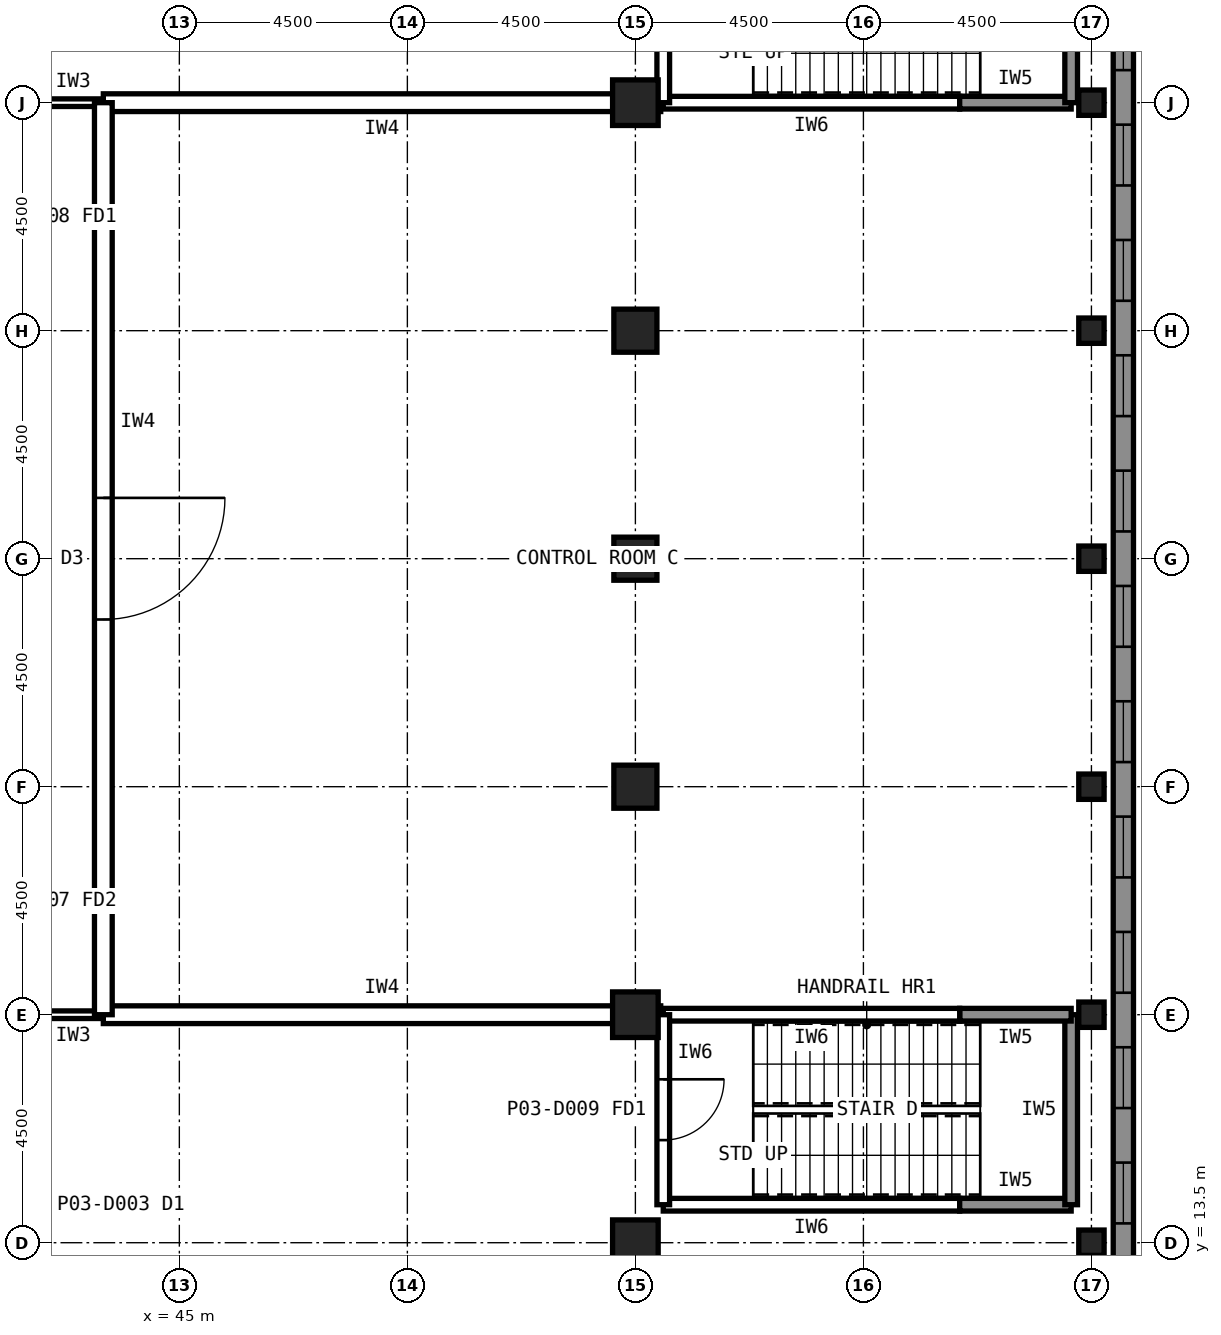
"""IFC4 building model, lengths in metres.
Left out: names, types, materials, properties, quantities, classifications, styles, units other than length and angle.
Written with IfcOpenShell. Run it as: python <this file> out.ifc"""

import sys

from ifc_helpers import new_model, si_unit, direction, frame, frame_2d, origin, origin_2d, place, context, subcontext, project, spatial, rectangle, hollow_rectangle, extrude, element, fill, save


model = new_model("IFC4")
c1 = context("Model", 3, precision=1e-05, world=origin(), true_north=direction((0.0, 1.0)))
c2 = subcontext(c1, "Body", "Model", "MODEL_VIEW")
j1 = project(units=[si_unit("LENGTHUNIT", "METRE"), si_unit("PLANEANGLEUNIT", "RADIAN")], contexts=[c1])
p1 = place(None, origin())
s1 = spatial("IfcSite", under=j1, at=p1, CompositionType="ELEMENT")
p2 = place(p1, origin())
s2 = spatial("IfcBuilding", under=s1, at=p2, CompositionType="ELEMENT")
p3 = place(p2, frame((0.0, 0.0, 12.0)))
s3 = spatial("IfcBuildingStorey", under=s2, at=p3, CompositionType="ELEMENT", Elevation=12.0)
for number, where, z_axis, x_axis in (
    (1, (54.0, 13.5, 0.0), (0.0, 0.0, 1.0), (1.0, 0.0, 0.0)),
    (2, (54.0, 18.0, 0.0), (0.0, 0.0, 1.0), (1.0, 0.0, 0.0)),
):
    element("IfcColumn", number, at=place(p3, frame(where, z_axis=z_axis, x_axis=x_axis)), inside=s3, PredefinedType="COLUMN", context=c2, shape_type="SweptSolid", body=[
        extrude(hollow_rectangle(XDim=0.9, YDim=0.9, WallThickness=0.063, at=origin_2d()), origin(), (0.0, 0.0, 1.0), 6.0),
    ])
for number, where, z_axis, x_axis in (
    (3, (54.0, 22.5, 0.0), (0.0, 0.0, 1.0), (1.0, 0.0, 0.0)),
    (4, (54.0, 27.0, 0.0), (0.0, 0.0, 1.0), (1.0, 0.0, 0.0)),
    (5, (54.0, 31.5, 0.0), (0.0, 0.0, 1.0), (1.0, 0.0, 0.0)),
):
    element("IfcColumn", number, at=place(p3, frame(where, z_axis=z_axis, x_axis=x_axis)), inside=s3, PredefinedType="COLUMN", context=c2, shape_type="SweptSolid", body=[
        extrude(hollow_rectangle(XDim=0.85, YDim=0.85, WallThickness=0.05, at=origin_2d()), origin(), (0.0, 0.0, 1.0), 6.0),
    ])
p4 = place(p3, frame((54.0, 36.0, 0.0), z_axis=(0.0, 0.0, 1.0), x_axis=(1.0, 0.0, 0.0)))
e6 = element("IfcColumn", 6, at=p4, inside=s3, PredefinedType="COLUMN", context=c2, shape_type="SweptSolid", body=[
    extrude(hollow_rectangle(XDim=0.9, YDim=0.9, WallThickness=0.063, at=origin_2d()), origin(), (0.0, 0.0, 1.0), 6.0),
])
for number, where, z_axis, x_axis in (
    (7, (63.0, 13.5, 0.0), (0.0, 0.0, 1.0), (1.0, 0.0, 0.0)),
    (8, (63.0, 18.0, 0.0), (0.0, 0.0, 1.0), (1.0, 0.0, 0.0)),
    (9, (63.0, 22.5, 0.0), (0.0, 0.0, 1.0), (1.0, 0.0, 0.0)),
    (10, (63.0, 27.0, 0.0), (0.0, 0.0, 1.0), (1.0, 0.0, 0.0)),
    (11, (63.0, 31.5, 0.0), (0.0, 0.0, 1.0), (1.0, 0.0, 0.0)),
    (12, (63.0, 36.0, 0.0), (0.0, 0.0, 1.0), (1.0, 0.0, 0.0)),
):
    element("IfcColumn", number, at=place(p3, frame(where, z_axis=z_axis, x_axis=x_axis)), inside=s3, PredefinedType="COLUMN", context=c2, shape_type="SweptSolid", body=[
        extrude(hollow_rectangle(XDim=0.5, YDim=0.5, WallThickness=0.022, at=origin_2d()), origin(), (0.0, 0.0, 1.0), 6.0),
    ])
p5 = place(p3, frame((63.63, 49.761, 0.0), z_axis=(0.0, 0.0, 1.0), x_axis=(0.0, -1.0, 0.0)))
e13 = element("IfcWall", 13, at=p5, inside=s3, PredefinedType="SOLIDWALL", context=c2, shape_type="SweptSolid", body=[
    extrude(rectangle(XDim=45.522, YDim=0.4, at=frame_2d((22.761, 0.0))), origin(), (0.0, 0.0, 1.0), 6.0),
])
p6 = place(p5, frame((0.538, 0.0, 0.9)))
e14 = element("IfcOpeningElement", 14, at=p6, cuts=e13, PredefinedType="OPENING", context=c2, shape_type="SweptSolid", body=[
    extrude(rectangle(XDim=1.2, YDim=1.5, at=frame_2d((0.6, 0.75))), frame((0.0, 0.21, 0.0), z_axis=(0.0, -1.0, 0.0), x_axis=(1.0, 0.0, 0.0)), (0.0, 0.0, 1.0), 0.42),
])
p7 = place(p5, frame((2.814, 0.0, 0.9)))
e15 = element("IfcOpeningElement", 15, at=p7, cuts=e13, PredefinedType="OPENING", context=c2, shape_type="SweptSolid", body=[
    extrude(rectangle(XDim=1.2, YDim=1.5, at=frame_2d((0.6, 0.75))), frame((0.0, 0.21, 0.0), z_axis=(0.0, -1.0, 0.0), x_axis=(1.0, 0.0, 0.0)), (0.0, 0.0, 1.0), 0.42),
])
p8 = place(p5, frame((5.09, 0.0, 0.9)))
e16 = element("IfcOpeningElement", 16, at=p8, cuts=e13, PredefinedType="OPENING", context=c2, shape_type="SweptSolid", body=[
    extrude(rectangle(XDim=1.2, YDim=1.5, at=frame_2d((0.6, 0.75))), frame((0.0, 0.21, 0.0), z_axis=(0.0, -1.0, 0.0), x_axis=(1.0, 0.0, 0.0)), (0.0, 0.0, 1.0), 0.42),
])
p9 = place(p5, frame((7.366, 0.0, 0.9)))
e17 = element("IfcOpeningElement", 17, at=p9, cuts=e13, PredefinedType="OPENING", context=c2, shape_type="SweptSolid", body=[
    extrude(rectangle(XDim=1.2, YDim=1.5, at=frame_2d((0.6, 0.75))), frame((0.0, 0.21, 0.0), z_axis=(0.0, -1.0, 0.0), x_axis=(1.0, 0.0, 0.0)), (0.0, 0.0, 1.0), 0.42),
])
p10 = place(p5, frame((9.642, 0.0, 0.9)))
e18 = element("IfcOpeningElement", 18, at=p10, cuts=e13, PredefinedType="OPENING", context=c2, shape_type="SweptSolid", body=[
    extrude(rectangle(XDim=1.2, YDim=1.5, at=frame_2d((0.6, 0.75))), frame((0.0, 0.21, 0.0), z_axis=(0.0, -1.0, 0.0), x_axis=(1.0, 0.0, 0.0)), (0.0, 0.0, 1.0), 0.42),
])
p11 = place(p5, frame((11.918, 0.0, 0.9)))
e19 = element("IfcOpeningElement", 19, at=p11, cuts=e13, PredefinedType="OPENING", context=c2, shape_type="SweptSolid", body=[
    extrude(rectangle(XDim=1.2, YDim=1.5, at=frame_2d((0.6, 0.75))), frame((0.0, 0.21, 0.0), z_axis=(0.0, -1.0, 0.0), x_axis=(1.0, 0.0, 0.0)), (0.0, 0.0, 1.0), 0.42),
])
p12 = place(p5, frame((14.195, 0.0, 0.9)))
e20 = element("IfcOpeningElement", 20, at=p12, cuts=e13, PredefinedType="OPENING", context=c2, shape_type="SweptSolid", body=[
    extrude(rectangle(XDim=1.2, YDim=1.5, at=frame_2d((0.6, 0.75))), frame((0.0, 0.21, 0.0), z_axis=(0.0, -1.0, 0.0), x_axis=(1.0, 0.0, 0.0)), (0.0, 0.0, 1.0), 0.42),
])
p13 = place(p5, frame((16.471, 0.0, 0.9)))
e21 = element("IfcOpeningElement", 21, at=p13, cuts=e13, PredefinedType="OPENING", context=c2, shape_type="SweptSolid", body=[
    extrude(rectangle(XDim=1.2, YDim=1.5, at=frame_2d((0.6, 0.75))), frame((0.0, 0.21, 0.0), z_axis=(0.0, -1.0, 0.0), x_axis=(1.0, 0.0, 0.0)), (0.0, 0.0, 1.0), 0.42),
])
p14 = place(p5, frame((18.747, 0.0, 0.9)))
e22 = element("IfcOpeningElement", 22, at=p14, cuts=e13, PredefinedType="OPENING", context=c2, shape_type="SweptSolid", body=[
    extrude(rectangle(XDim=1.2, YDim=1.5, at=frame_2d((0.6, 0.75))), frame((0.0, 0.21, 0.0), z_axis=(0.0, -1.0, 0.0), x_axis=(1.0, 0.0, 0.0)), (0.0, 0.0, 1.0), 0.42),
])
p15 = place(p5, frame((21.023, 0.0, 0.9)))
e23 = element("IfcOpeningElement", 23, at=p15, cuts=e13, PredefinedType="OPENING", context=c2, shape_type="SweptSolid", body=[
    extrude(rectangle(XDim=1.2, YDim=1.5, at=frame_2d((0.6, 0.75))), frame((0.0, 0.21, 0.0), z_axis=(0.0, -1.0, 0.0), x_axis=(1.0, 0.0, 0.0)), (0.0, 0.0, 1.0), 0.42),
])
p16 = place(p5, frame((23.299, 0.0, 0.9)))
e24 = element("IfcOpeningElement", 24, at=p16, cuts=e13, PredefinedType="OPENING", context=c2, shape_type="SweptSolid", body=[
    extrude(rectangle(XDim=1.2, YDim=1.5, at=frame_2d((0.6, 0.75))), frame((0.0, 0.21, 0.0), z_axis=(0.0, -1.0, 0.0), x_axis=(1.0, 0.0, 0.0)), (0.0, 0.0, 1.0), 0.42),
])
p17 = place(p5, frame((25.575, 0.0, 0.9)))
e25 = element("IfcOpeningElement", 25, at=p17, cuts=e13, PredefinedType="OPENING", context=c2, shape_type="SweptSolid", body=[
    extrude(rectangle(XDim=1.2, YDim=1.5, at=frame_2d((0.6, 0.75))), frame((0.0, 0.21, 0.0), z_axis=(0.0, -1.0, 0.0), x_axis=(1.0, 0.0, 0.0)), (0.0, 0.0, 1.0), 0.42),
])
p18 = place(p5, frame((27.851, 0.0, 0.9)))
e26 = element("IfcOpeningElement", 26, at=p18, cuts=e13, PredefinedType="OPENING", context=c2, shape_type="SweptSolid", body=[
    extrude(rectangle(XDim=1.2, YDim=1.5, at=frame_2d((0.6, 0.75))), frame((0.0, 0.21, 0.0), z_axis=(0.0, -1.0, 0.0), x_axis=(1.0, 0.0, 0.0)), (0.0, 0.0, 1.0), 0.42),
])
p19 = place(p5, frame((30.127, 0.0, 0.9)))
e27 = element("IfcOpeningElement", 27, at=p19, cuts=e13, PredefinedType="OPENING", context=c2, shape_type="SweptSolid", body=[
    extrude(rectangle(XDim=1.2, YDim=1.5, at=frame_2d((0.6, 0.75))), frame((0.0, 0.21, 0.0), z_axis=(0.0, -1.0, 0.0), x_axis=(1.0, 0.0, 0.0)), (0.0, 0.0, 1.0), 0.42),
])
p20 = place(p5, frame((32.404, 0.0, 0.9)))
e28 = element("IfcOpeningElement", 28, at=p20, cuts=e13, PredefinedType="OPENING", context=c2, shape_type="SweptSolid", body=[
    extrude(rectangle(XDim=1.2, YDim=1.5, at=frame_2d((0.6, 0.75))), frame((0.0, 0.21, 0.0), z_axis=(0.0, -1.0, 0.0), x_axis=(1.0, 0.0, 0.0)), (0.0, 0.0, 1.0), 0.42),
])
p21 = place(p5, frame((34.679, 0.0, 0.9)))
e29 = element("IfcOpeningElement", 29, at=p21, cuts=e13, PredefinedType="OPENING", context=c2, shape_type="SweptSolid", body=[
    extrude(rectangle(XDim=1.2, YDim=1.5, at=frame_2d((0.6, 0.75))), frame((0.0, 0.21, 0.0), z_axis=(0.0, -1.0, 0.0), x_axis=(1.0, 0.0, 0.0)), (0.0, 0.0, 1.0), 0.42),
])
p22 = place(p5, frame((36.956, 0.0, 0.9)))
e30 = element("IfcOpeningElement", 30, at=p22, cuts=e13, PredefinedType="OPENING", context=c2, shape_type="SweptSolid", body=[
    extrude(rectangle(XDim=1.2, YDim=1.5, at=frame_2d((0.6, 0.75))), frame((0.0, 0.21, 0.0), z_axis=(0.0, -1.0, 0.0), x_axis=(1.0, 0.0, 0.0)), (0.0, 0.0, 1.0), 0.42),
])
p23 = place(p5, frame((39.232, 0.0, 0.9)))
e31 = element("IfcOpeningElement", 31, at=p23, cuts=e13, PredefinedType="OPENING", context=c2, shape_type="SweptSolid", body=[
    extrude(rectangle(XDim=1.2, YDim=1.5, at=frame_2d((0.6, 0.75))), frame((0.0, 0.21, 0.0), z_axis=(0.0, -1.0, 0.0), x_axis=(1.0, 0.0, 0.0)), (0.0, 0.0, 1.0), 0.42),
])
p24 = place(p5, frame((41.508, 0.0, 0.9)))
e32 = element("IfcOpeningElement", 32, at=p24, cuts=e13, PredefinedType="OPENING", context=c2, shape_type="SweptSolid", body=[
    extrude(rectangle(XDim=1.2, YDim=1.5, at=frame_2d((0.6, 0.75))), frame((0.0, 0.21, 0.0), z_axis=(0.0, -1.0, 0.0), x_axis=(1.0, 0.0, 0.0)), (0.0, 0.0, 1.0), 0.42),
])
p25 = place(p5, frame((43.784, 0.0, 0.9)))
e33 = element("IfcOpeningElement", 33, at=p25, cuts=e13, PredefinedType="OPENING", context=c2, shape_type="SweptSolid", body=[
    extrude(rectangle(XDim=1.2, YDim=1.5, at=frame_2d((0.6, 0.75))), frame((0.0, 0.21, 0.0), z_axis=(0.0, -1.0, 0.0), x_axis=(1.0, 0.0, 0.0)), (0.0, 0.0, 1.0), 0.42),
])
for number, where, z_axis, x_axis in (
    (34, (42.3, 18.0, 0.0), (0.0, 0.0, 1.0), (1.0, 0.0, 0.0)),
    (35, (43.51, 36.0, 0.0), (0.0, 0.0, 1.0), (-1.0, 0.0, 0.0)),
):
    element("IfcWall", number, at=place(p3, frame(where, z_axis=z_axis, x_axis=x_axis)), inside=s3, PredefinedType="PARTITIONING", context=c2, shape_type="SweptSolid", body=[
        extrude(rectangle(XDim=1.21, YDim=0.15, at=frame_2d((0.605, 0.0))), origin(), (0.0, 0.0, 1.0), 4.949),
    ])
for number, where, z_axis, x_axis in (
    (36, (43.5, 18.0, 0.0), (0.0, 0.0, 1.0), (1.0, 0.0, 0.0)),
    (37, (54.5, 36.0, 0.0), (0.0, 0.0, 1.0), (-1.0, 0.0, 0.0)),
):
    element("IfcWall", number, at=place(p3, frame(where, z_axis=z_axis, x_axis=x_axis)), inside=s3, PredefinedType="PARTITIONING", context=c2, shape_type="SweptSolid", body=[
        extrude(rectangle(XDim=11.0, YDim=0.35, at=frame_2d((5.5, 0.0))), origin(), (0.0, 0.0, 1.0), 4.949),
    ])
p26 = place(p3, frame((43.5, 36.0, 0.0), z_axis=(0.0, 0.0, 1.0), x_axis=(0.0, -1.0, 0.0)))
e38 = element("IfcWall", 38, at=p26, inside=s3, PredefinedType="PARTITIONING", context=c2, shape_type="SweptSolid", body=[
    extrude(rectangle(XDim=18.0, YDim=0.35, at=frame_2d((9.0, 0.0))), origin(), (0.0, 0.0, 1.0), 5.8),
])
p27 = place(p26, frame((7.8, 0.0, 0.0)))
e39 = element("IfcOpeningElement", 39, at=p27, cuts=e38, PredefinedType="OPENING", context=c2, shape_type="SweptSolid", body=[
    extrude(rectangle(XDim=2.4, YDim=3.0, at=frame_2d((1.2, 1.5))), frame((0.0, 0.185, 0.0), z_axis=(0.0, -1.0, 0.0), x_axis=(1.0, 0.0, 0.0)), (0.0, 0.0, 1.0), 0.37),
])
p28 = place(p3, frame((54.55, 14.25, 0.0), z_axis=(0.0, 0.0, 1.0), x_axis=(1.0, 0.0, 0.0)))
e40 = element("IfcWall", 40, at=p28, inside=s3, PredefinedType="PARTITIONING", context=c2, shape_type="SweptSolid", body=[
    extrude(rectangle(XDim=5.85, YDim=0.25, at=frame_2d((2.925, 0.0))), origin(), (0.0, 0.0, 1.0), 5.8),
])
p29 = place(p3, frame((60.4, 14.25, 0.0), z_axis=(0.0, 0.0, 1.0), x_axis=(1.0, 0.0, 0.0)))
e41 = element("IfcWall", 41, at=p29, inside=s3, PredefinedType="SOLIDWALL", context=c2, shape_type="SweptSolid", body=[
    extrude(rectangle(XDim=2.2, YDim=0.25, at=frame_2d((1.1, 0.0))), origin(), (0.0, 0.0, 1.0), 6.0),
])
p30 = place(p3, frame((62.6, 14.25, 0.0), z_axis=(0.0, 0.0, 1.0), x_axis=(0.0, 1.0, 0.0)))
e42 = element("IfcWall", 42, at=p30, inside=s3, PredefinedType="SOLIDWALL", context=c2, shape_type="SweptSolid", body=[
    extrude(rectangle(XDim=3.75, YDim=0.25, at=frame_2d((1.875, 0.0))), origin(), (0.0, 0.0, 1.0), 6.0),
])
p31 = place(p3, frame((62.6, 18.0, 0.0), z_axis=(0.0, 0.0, 1.0), x_axis=(-1.0, 0.0, 0.0)))
e43 = element("IfcWall", 43, at=p31, inside=s3, PredefinedType="SOLIDWALL", context=c2, shape_type="SweptSolid", body=[
    extrude(rectangle(XDim=2.2, YDim=0.25, at=frame_2d((1.1, 0.0))), origin(), (0.0, 0.0, 1.0), 5.189),
])
p32 = place(p3, frame((60.4, 18.0, 0.0), z_axis=(0.0, 0.0, 1.0), x_axis=(-1.0, 0.0, 0.0)))
e44 = element("IfcWall", 44, at=p32, inside=s3, PredefinedType="PARTITIONING", context=c2, shape_type="SweptSolid", body=[
    extrude(rectangle(XDim=5.85, YDim=0.25, at=frame_2d((2.925, 0.0))), origin(), (0.0, 0.0, 1.0), 5.189),
])
p33 = place(p3, frame((54.55, 18.0, 0.0), z_axis=(0.0, 0.0, 1.0), x_axis=(0.0, -1.0, 0.0)))
e45 = element("IfcWall", 45, at=p33, inside=s3, PredefinedType="PARTITIONING", context=c2, shape_type="SweptSolid", body=[
    extrude(rectangle(XDim=3.75, YDim=0.25, at=frame_2d((1.875, 0.0))), origin(), (0.0, 0.0, 1.0), 5.8),
])
p34 = place(p33, frame((1.275, 0.0, 0.0)))
e46 = element("IfcOpeningElement", 46, at=p34, cuts=e45, PredefinedType="OPENING", context=c2, shape_type="SweptSolid", body=[
    extrude(rectangle(XDim=1.2, YDim=2.1, at=frame_2d((0.6, 1.05))), frame((0.0, 0.135, 0.0), z_axis=(0.0, -1.0, 0.0), x_axis=(1.0, 0.0, 0.0)), (0.0, 0.0, 1.0), 0.27),
])
p35 = place(p3, frame((54.55, 36.0, 0.0), z_axis=(0.0, 0.0, 1.0), x_axis=(1.0, 0.0, 0.0)))
e47 = element("IfcWall", 47, at=p35, inside=s3, PredefinedType="PARTITIONING", context=c2, shape_type="SweptSolid", body=[
    extrude(rectangle(XDim=5.85, YDim=0.25, at=frame_2d((2.925, 0.0))), origin(), (0.0, 0.0, 1.0), 5.189),
])
p36 = place(p3, frame((60.4, 36.0, 0.0), z_axis=(0.0, 0.0, 1.0), x_axis=(1.0, 0.0, 0.0)))
e48 = element("IfcWall", 48, at=p36, inside=s3, PredefinedType="SOLIDWALL", context=c2, shape_type="SweptSolid", body=[
    extrude(rectangle(XDim=2.2, YDim=0.25, at=frame_2d((1.1, 0.0))), origin(), (0.0, 0.0, 1.0), 5.189),
])
p37 = place(p3, frame((62.6, 36.0, 0.0), z_axis=(0.0, 0.0, 1.0), x_axis=(0.0, 1.0, 0.0)))
e49 = element("IfcWall", 49, at=p37, inside=s3, PredefinedType="SOLIDWALL", context=c2, shape_type="SweptSolid", body=[
    extrude(rectangle(XDim=3.75, YDim=0.25, at=frame_2d((1.875, 0.0))), origin(), (0.0, 0.0, 1.0), 6.0),
])
p38 = place(p3, frame((54.55, 39.75, 0.0), z_axis=(0.0, 0.0, 1.0), x_axis=(0.0, -1.0, 0.0)))
e50 = element("IfcWall", 50, at=p38, inside=s3, PredefinedType="PARTITIONING", context=c2, shape_type="SweptSolid", body=[
    extrude(rectangle(XDim=3.75, YDim=0.25, at=frame_2d((1.875, 0.0))), origin(), (0.0, 0.0, 1.0), 5.8),
])
p39 = place(p38, frame((1.275, 0.0, 0.0)))
e51 = element("IfcOpeningElement", 51, at=p39, cuts=e50, PredefinedType="OPENING", context=c2, shape_type="SweptSolid", body=[
    extrude(rectangle(XDim=1.2, YDim=2.1, at=frame_2d((0.6, 1.05))), frame((0.0, 0.135, 0.0), z_axis=(0.0, -1.0, 0.0), x_axis=(1.0, 0.0, 0.0)), (0.0, 0.0, 1.0), 0.27),
])
p40 = place(p11, origin())
e52 = element("IfcWindow", 52, at=p40, inside=s3, PartitioningType="SINGLE_PANEL", PredefinedType="WINDOW", context=c2, shape_type="SweptSolid", body=[
    extrude(rectangle(XDim=1.2, YDim=1.5, at=frame_2d((0.6, 0.75))), frame((0.0, 0.03, 0.0), z_axis=(0.0, -1.0, 0.0), x_axis=(1.0, 0.0, 0.0)), (0.0, 0.0, 1.0), 0.06),
])
fill(e19, e52)
p41 = place(p12, origin())
e53 = element("IfcWindow", 53, at=p41, inside=s3, PartitioningType="SINGLE_PANEL", PredefinedType="WINDOW", context=c2, shape_type="SweptSolid", body=[
    extrude(rectangle(XDim=1.2, YDim=1.5, at=frame_2d((0.6, 0.75))), frame((0.0, 0.03, 0.0), z_axis=(0.0, -1.0, 0.0), x_axis=(1.0, 0.0, 0.0)), (0.0, 0.0, 1.0), 0.06),
])
fill(e20, e53)
p42 = place(p13, origin())
e54 = element("IfcWindow", 54, at=p42, inside=s3, PartitioningType="SINGLE_PANEL", PredefinedType="WINDOW", context=c2, shape_type="SweptSolid", body=[
    extrude(rectangle(XDim=1.2, YDim=1.5, at=frame_2d((0.6, 0.75))), frame((0.0, 0.03, 0.0), z_axis=(0.0, -1.0, 0.0), x_axis=(1.0, 0.0, 0.0)), (0.0, 0.0, 1.0), 0.06),
])
fill(e21, e54)
p43 = place(p14, origin())
e55 = element("IfcWindow", 55, at=p43, inside=s3, PartitioningType="SINGLE_PANEL", PredefinedType="WINDOW", context=c2, shape_type="SweptSolid", body=[
    extrude(rectangle(XDim=1.2, YDim=1.5, at=frame_2d((0.6, 0.75))), frame((0.0, 0.03, 0.0), z_axis=(0.0, -1.0, 0.0), x_axis=(1.0, 0.0, 0.0)), (0.0, 0.0, 1.0), 0.06),
])
fill(e22, e55)
p44 = place(p15, origin())
e56 = element("IfcWindow", 56, at=p44, inside=s3, PartitioningType="SINGLE_PANEL", PredefinedType="WINDOW", context=c2, shape_type="SweptSolid", body=[
    extrude(rectangle(XDim=1.2, YDim=1.5, at=frame_2d((0.6, 0.75))), frame((0.0, 0.03, 0.0), z_axis=(0.0, -1.0, 0.0), x_axis=(1.0, 0.0, 0.0)), (0.0, 0.0, 1.0), 0.06),
])
fill(e23, e56)
p45 = place(p16, origin())
e57 = element("IfcWindow", 57, at=p45, inside=s3, PartitioningType="SINGLE_PANEL", PredefinedType="WINDOW", context=c2, shape_type="SweptSolid", body=[
    extrude(rectangle(XDim=1.2, YDim=1.5, at=frame_2d((0.6, 0.75))), frame((0.0, 0.03, 0.0), z_axis=(0.0, -1.0, 0.0), x_axis=(1.0, 0.0, 0.0)), (0.0, 0.0, 1.0), 0.06),
])
fill(e24, e57)
p46 = place(p17, origin())
e58 = element("IfcWindow", 58, at=p46, inside=s3, PartitioningType="SINGLE_PANEL", PredefinedType="WINDOW", context=c2, shape_type="SweptSolid", body=[
    extrude(rectangle(XDim=1.2, YDim=1.5, at=frame_2d((0.6, 0.75))), frame((0.0, 0.03, 0.0), z_axis=(0.0, -1.0, 0.0), x_axis=(1.0, 0.0, 0.0)), (0.0, 0.0, 1.0), 0.06),
])
fill(e25, e58)
p47 = place(p18, origin())
e59 = element("IfcWindow", 59, at=p47, inside=s3, PartitioningType="SINGLE_PANEL", PredefinedType="WINDOW", context=c2, shape_type="SweptSolid", body=[
    extrude(rectangle(XDim=1.2, YDim=1.5, at=frame_2d((0.6, 0.75))), frame((0.0, 0.03, 0.0), z_axis=(0.0, -1.0, 0.0), x_axis=(1.0, 0.0, 0.0)), (0.0, 0.0, 1.0), 0.06),
])
fill(e26, e59)
p48 = place(p19, origin())
e60 = element("IfcWindow", 60, at=p48, inside=s3, PartitioningType="SINGLE_PANEL", PredefinedType="WINDOW", context=c2, shape_type="SweptSolid", body=[
    extrude(rectangle(XDim=1.2, YDim=1.5, at=frame_2d((0.6, 0.75))), frame((0.0, 0.03, 0.0), z_axis=(0.0, -1.0, 0.0), x_axis=(1.0, 0.0, 0.0)), (0.0, 0.0, 1.0), 0.06),
])
fill(e27, e60)
p49 = place(p20, origin())
e61 = element("IfcWindow", 61, at=p49, inside=s3, PartitioningType="SINGLE_PANEL", PredefinedType="WINDOW", context=c2, shape_type="SweptSolid", body=[
    extrude(rectangle(XDim=1.2, YDim=1.5, at=frame_2d((0.6, 0.75))), frame((0.0, 0.03, 0.0), z_axis=(0.0, -1.0, 0.0), x_axis=(1.0, 0.0, 0.0)), (0.0, 0.0, 1.0), 0.06),
])
fill(e28, e61)
p50 = place(p21, origin())
e62 = element("IfcWindow", 62, at=p50, inside=s3, PartitioningType="SINGLE_PANEL", PredefinedType="WINDOW", context=c2, shape_type="SweptSolid", body=[
    extrude(rectangle(XDim=1.2, YDim=1.5, at=frame_2d((0.6, 0.75))), frame((0.0, 0.03, 0.0), z_axis=(0.0, -1.0, 0.0), x_axis=(1.0, 0.0, 0.0)), (0.0, 0.0, 1.0), 0.06),
])
fill(e29, e62)
p51 = place(p27, origin())
e63 = element("IfcDoor", 63, at=p51, inside=s3, OperationType="SINGLE_SWING_LEFT", PredefinedType="DOOR", context=c2, shape_type="SweptSolid", body=[
    extrude(rectangle(XDim=2.4, YDim=3.0, at=frame_2d((1.2, 1.5))), frame((0.0, 0.025, 0.0), z_axis=(0.0, -1.0, 0.0), x_axis=(1.0, 0.0, 0.0)), (0.0, 0.0, 1.0), 0.05),
])
fill(e39, e63)
p52 = place(p34, origin())
e64 = element("IfcDoor", 64, at=p52, inside=s3, OperationType="SINGLE_SWING_LEFT", PredefinedType="DOOR", context=c2, shape_type="SweptSolid", body=[
    extrude(rectangle(XDim=1.2, YDim=2.1, at=frame_2d((0.6, 1.05))), frame((0.0, 0.025, 0.0), z_axis=(0.0, -1.0, 0.0), x_axis=(1.0, 0.0, 0.0)), (0.0, 0.0, 1.0), 0.05),
])
fill(e46, e64)
save(model, sys.argv[1])
